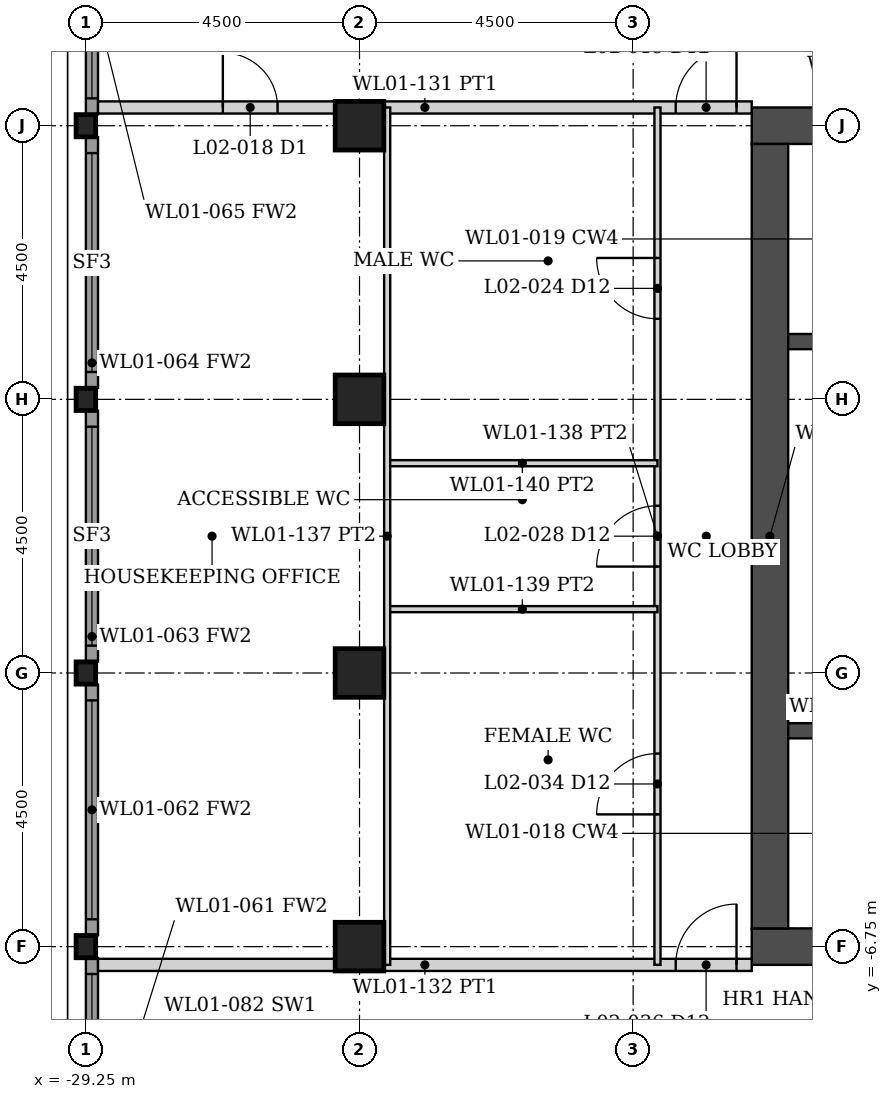
"""IFC4 building model, lengths in metres.
Left out: names, types, materials, properties, quantities, classifications, styles, units other than length and angle.
Written with IfcOpenShell. Run it as: python <this file> out.ifc"""

import sys

from ifc_helpers import new_model, si_unit, direction, frame, frame_2d, origin, origin_2d, place, context, subcontext, project, spatial, rectangle, hollow_rectangle, i_section, extrude, element, fill, save


model = new_model("IFC4")
c1 = context("Model", 3, precision=1e-05, world=origin(), true_north=direction((0.0, 1.0)))
c2 = subcontext(c1, "Body", "Model", "MODEL_VIEW")
j1 = project(units=[si_unit("LENGTHUNIT", "METRE"), si_unit("PLANEANGLEUNIT", "RADIAN")], contexts=[c1])
p1 = place(None, origin())
s1 = spatial("IfcSite", under=j1, at=p1, CompositionType="ELEMENT")
p2 = place(p1, origin())
s2 = spatial("IfcBuilding", under=s1, at=p2, CompositionType="ELEMENT")
p3 = place(p2, frame((0.0, 0.0, 11.0)))
s3 = spatial("IfcBuildingStorey", under=s2, at=p3, CompositionType="ELEMENT", Elevation=11.0)
for number, where, z_axis, x_axis in (
    (1, (-24.75, -6.75, 0.0), (0.0, 0.0, 1.0), (1.0, 0.0, 0.0)),
    (2, (-24.75, -2.25, 0.0), (0.0, 0.0, 1.0), (1.0, 0.0, 0.0)),
    (3, (-24.75, 2.25, 0.0), (0.0, 0.0, 1.0), (1.0, 0.0, 0.0)),
    (4, (-24.75, 6.75, 0.0), (0.0, 0.0, 1.0), (1.0, 0.0, 0.0)),
):
    element("IfcColumn", number, at=place(p3, frame(where, z_axis=z_axis, x_axis=x_axis)), inside=s3, PredefinedType="COLUMN", context=c2, shape_type="SweptSolid", body=[
        extrude(hollow_rectangle(XDim=0.8, YDim=0.8, WallThickness=0.08, at=origin_2d()), origin(), (0.0, 0.0, 1.0), 5.0),
    ])
for number, where, z_axis, x_axis in (
    (5, (-29.25, -6.75, 0.0), (0.0, 0.0, 1.0), (1.0, 0.0, 0.0)),
    (6, (-29.25, -2.25, 0.0), (0.0, 0.0, 1.0), (1.0, 0.0, 0.0)),
    (7, (-29.25, 2.25, 0.0), (0.0, 0.0, 1.0), (1.0, 0.0, 0.0)),
    (8, (-29.25, 6.75, 0.0), (0.0, 0.0, 1.0), (1.0, 0.0, 0.0)),
):
    element("IfcColumn", number, at=place(p3, frame(where, z_axis=z_axis, x_axis=x_axis)), inside=s3, PredefinedType="COLUMN", context=c2, shape_type="SweptSolid", body=[
        extrude(i_section(OverallWidth=0.322, OverallDepth=0.365, WebThickness=0.027, FlangeThickness=0.044, FilletRadius=0.015, at=origin_2d()), origin(), (0.0, 0.0, 1.0), 5.0),
    ])
for number, where, z_axis, x_axis in (
    (9, (-8.7, -6.75, 0.0), (0.0, 0.0, 1.0), (-1.0, 0.0, 0.0)),
    (10, (-8.7, 6.75, 0.0), (0.0, 0.0, 1.0), (-1.0, 0.0, 0.0)),
):
    element("IfcWall", number, at=place(p3, frame(where, z_axis=z_axis, x_axis=x_axis)), inside=s3, PredefinedType="SHEAR", context=c2, shape_type="SweptSolid", body=[
        extrude(rectangle(XDim=9.6, YDim=0.6, at=frame_2d((4.8, 0.0))), origin(), (0.0, 0.0, 1.0), 5.0),
    ])
p4 = place(p3, frame((-18.0, -6.45, 0.0), z_axis=(0.0, 0.0, 1.0), x_axis=(0.0, 1.0, 0.0)))
e11 = element("IfcWall", 11, at=p4, inside=s3, PredefinedType="SHEAR", context=c2, shape_type="SweptSolid", body=[
    extrude(rectangle(XDim=12.9, YDim=0.6, at=frame_2d((6.45, 0.0))), origin(), (0.0, 0.0, 1.0), 5.0),
])
p5 = place(p3, frame((-9.3, -3.2, 0.0), z_axis=(0.0, 0.0, 1.0), x_axis=(-1.0, 0.0, 0.0)))
e12 = element("IfcWall", 12, at=p5, inside=s3, PredefinedType="SHEAR", context=c2, shape_type="SweptSolid", body=[
    extrude(rectangle(XDim=8.4, YDim=0.25, at=frame_2d((4.2, 0.0))), origin(), (0.0, 0.0, 1.0), 5.0),
])
p6 = place(p5, frame((0.15, 0.0, 0.0)))
e13 = element("IfcOpeningElement", 13, at=p6, cuts=e12, PredefinedType="OPENING", context=c2, shape_type="SweptSolid", body=[
    extrude(rectangle(XDim=1.0, YDim=2.1, at=frame_2d((0.5, 1.05))), frame((0.0, 0.135, 0.0), z_axis=(0.0, -1.0, 0.0), x_axis=(1.0, 0.0, 0.0)), (0.0, 0.0, 1.0), 0.27),
])
p7 = place(p3, frame((-9.3, 3.2, 0.0), z_axis=(0.0, 0.0, 1.0), x_axis=(-1.0, 0.0, 0.0)))
e14 = element("IfcWall", 14, at=p7, inside=s3, PredefinedType="SHEAR", context=c2, shape_type="SweptSolid", body=[
    extrude(rectangle(XDim=8.4, YDim=0.25, at=frame_2d((4.2, 0.0))), origin(), (0.0, 0.0, 1.0), 5.0),
])
p8 = place(p3, frame((-29.15, -11.062, 0.0), z_axis=(0.0, 0.0, 1.0), x_axis=(0.0, 1.0, 0.0)))
e15 = element("IfcWall", 15, at=p8, inside=s3, PredefinedType="SOLIDWALL", context=c2, shape_type="SweptSolid", body=[
    extrude(rectangle(XDim=4.125, YDim=0.2, at=frame_2d((2.062, 0.0))), origin(), (0.0, 0.0, 1.0), 4.133),
])
p9 = place(p8, frame((0.262, 0.0, 0.15)))
e16 = element("IfcOpeningElement", 16, at=p9, cuts=e15, PredefinedType="OPENING", context=c2, shape_type="SweptSolid", body=[
    extrude(rectangle(XDim=3.6, YDim=3.833, at=frame_2d((1.8, 1.917))), frame((0.0, 0.11, 0.0), z_axis=(0.0, -1.0, 0.0), x_axis=(1.0, 0.0, 0.0)), (0.0, 0.0, 1.0), 0.22),
])
p10 = place(p3, frame((-29.15, -6.562, 0.0), z_axis=(0.0, 0.0, 1.0), x_axis=(0.0, 1.0, 0.0)))
e17 = element("IfcWall", 17, at=p10, inside=s3, PredefinedType="SOLIDWALL", context=c2, shape_type="SweptSolid", body=[
    extrude(rectangle(XDim=4.125, YDim=0.2, at=frame_2d((2.062, 0.0))), origin(), (0.0, 0.0, 1.0), 4.133),
])
p11 = place(p10, frame((0.262, 0.0, 0.15)))
e18 = element("IfcOpeningElement", 18, at=p11, cuts=e17, PredefinedType="OPENING", context=c2, shape_type="SweptSolid", body=[
    extrude(rectangle(XDim=3.6, YDim=3.833, at=frame_2d((1.8, 1.917))), frame((0.0, 0.11, 0.0), z_axis=(0.0, -1.0, 0.0), x_axis=(1.0, 0.0, 0.0)), (0.0, 0.0, 1.0), 0.22),
])
p12 = place(p3, frame((-29.15, -2.062, 0.0), z_axis=(0.0, 0.0, 1.0), x_axis=(0.0, 1.0, 0.0)))
e19 = element("IfcWall", 19, at=p12, inside=s3, PredefinedType="SOLIDWALL", context=c2, shape_type="SweptSolid", body=[
    extrude(rectangle(XDim=4.125, YDim=0.2, at=frame_2d((2.062, 0.0))), origin(), (0.0, 0.0, 1.0), 4.133),
])
p13 = place(p12, frame((0.262, 0.0, 0.15)))
e20 = element("IfcOpeningElement", 20, at=p13, cuts=e19, PredefinedType="OPENING", context=c2, shape_type="SweptSolid", body=[
    extrude(rectangle(XDim=3.6, YDim=3.833, at=frame_2d((1.8, 1.917))), frame((0.0, 0.11, 0.0), z_axis=(0.0, -1.0, 0.0), x_axis=(1.0, 0.0, 0.0)), (0.0, 0.0, 1.0), 0.22),
])
p14 = place(p3, frame((-29.15, 2.438, 0.0), z_axis=(0.0, 0.0, 1.0), x_axis=(0.0, 1.0, 0.0)))
e21 = element("IfcWall", 21, at=p14, inside=s3, PredefinedType="SOLIDWALL", context=c2, shape_type="SweptSolid", body=[
    extrude(rectangle(XDim=4.125, YDim=0.2, at=frame_2d((2.062, 0.0))), origin(), (0.0, 0.0, 1.0), 4.133),
])
p15 = place(p14, frame((0.262, 0.0, 0.15)))
e22 = element("IfcOpeningElement", 22, at=p15, cuts=e21, PredefinedType="OPENING", context=c2, shape_type="SweptSolid", body=[
    extrude(rectangle(XDim=3.6, YDim=3.833, at=frame_2d((1.8, 1.917))), frame((0.0, 0.11, 0.0), z_axis=(0.0, -1.0, 0.0), x_axis=(1.0, 0.0, 0.0)), (0.0, 0.0, 1.0), 0.22),
])
p16 = place(p3, frame((-29.15, 6.938, 0.0), z_axis=(0.0, 0.0, 1.0), x_axis=(0.0, 1.0, 0.0)))
e23 = element("IfcWall", 23, at=p16, inside=s3, PredefinedType="SOLIDWALL", context=c2, shape_type="SweptSolid", body=[
    extrude(rectangle(XDim=4.125, YDim=0.2, at=frame_2d((2.062, 0.0))), origin(), (0.0, 0.0, 1.0), 4.133),
])
p17 = place(p16, frame((0.262, 0.0, 0.15)))
e24 = element("IfcOpeningElement", 24, at=p17, cuts=e23, PredefinedType="OPENING", context=c2, shape_type="SweptSolid", body=[
    extrude(rectangle(XDim=3.6, YDim=3.833, at=frame_2d((1.8, 1.917))), frame((0.0, 0.11, 0.0), z_axis=(0.0, -1.0, 0.0), x_axis=(1.0, 0.0, 0.0)), (0.0, 0.0, 1.0), 0.22),
])
p18 = place(p3, frame((-29.05, 7.05, 0.0), z_axis=(0.0, 0.0, 1.0), x_axis=(1.0, 0.0, 0.0)))
e25 = element("IfcWall", 25, at=p18, inside=s3, PredefinedType="PARTITIONING", context=c2, shape_type="SweptSolid", body=[
    extrude(rectangle(XDim=10.75, YDim=0.2, at=frame_2d((5.375, 0.0))), origin(), (0.0, 0.0, 1.0), 3.829),
])
p19 = place(p18, frame((2.052, 0.0, 0.0)))
e26 = element("IfcOpeningElement", 26, at=p19, cuts=e25, PredefinedType="OPENING", context=c2, shape_type="SweptSolid", body=[
    extrude(rectangle(XDim=0.9, YDim=2.1, at=frame_2d((0.45, 1.05))), frame((0.0, 0.11, 0.0), z_axis=(0.0, -1.0, 0.0), x_axis=(1.0, 0.0, 0.0)), (0.0, 0.0, 1.0), 0.22),
])
p20 = place(p18, frame((9.5, 0.0, 0.0)))
e27 = element("IfcOpeningElement", 27, at=p20, cuts=e25, PredefinedType="OPENING", context=c2, shape_type="SweptSolid", body=[
    extrude(rectangle(XDim=1.0, YDim=2.1, at=frame_2d((0.5, 1.05))), frame((0.0, 0.11, 0.0), z_axis=(0.0, -1.0, 0.0), x_axis=(1.0, 0.0, 0.0)), (0.0, 0.0, 1.0), 0.22),
])
p21 = place(p3, frame((-29.05, -7.05, 0.0), z_axis=(0.0, 0.0, 1.0), x_axis=(1.0, 0.0, 0.0)))
e28 = element("IfcWall", 28, at=p21, inside=s3, PredefinedType="PARTITIONING", context=c2, shape_type="SweptSolid", body=[
    extrude(rectangle(XDim=10.75, YDim=0.2, at=frame_2d((5.375, 0.0))), origin(), (0.0, 0.0, 1.0), 3.829),
])
p22 = place(p21, frame((9.5, 0.0, 0.0)))
e29 = element("IfcOpeningElement", 29, at=p22, cuts=e28, PredefinedType="OPENING", context=c2, shape_type="SweptSolid", body=[
    extrude(rectangle(XDim=1.0, YDim=2.1, at=frame_2d((0.5, 1.05))), frame((0.0, 0.11, 0.0), z_axis=(0.0, -1.0, 0.0), x_axis=(1.0, 0.0, 0.0)), (0.0, 0.0, 1.0), 0.22),
])
p23 = place(p3, frame((-19.85, -7.05, 0.0), z_axis=(0.0, 0.0, 1.0), x_axis=(0.0, 1.0, 0.0)))
e30 = element("IfcWall", 30, at=p23, inside=s3, PredefinedType="PARTITIONING", context=c2, shape_type="SweptSolid", body=[
    extrude(rectangle(XDim=14.1, YDim=0.1, at=frame_2d((7.05, 0.0))), origin(), (0.0, 0.0, 1.0), 3.829),
])
p24 = place(p23, frame((2.475, 0.0, 0.0)))
e31 = element("IfcOpeningElement", 31, at=p24, cuts=e30, PredefinedType="OPENING", context=c2, shape_type="SweptSolid", body=[
    extrude(rectangle(XDim=1.0, YDim=2.1, at=frame_2d((0.5, 1.05))), frame((0.0, 0.06, 0.0), z_axis=(0.0, -1.0, 0.0), x_axis=(1.0, 0.0, 0.0)), (0.0, 0.0, 1.0), 0.12),
])
p25 = place(p23, frame((6.55, 0.0, 0.0)))
e32 = element("IfcOpeningElement", 32, at=p25, cuts=e30, PredefinedType="OPENING", context=c2, shape_type="SweptSolid", body=[
    extrude(rectangle(XDim=1.0, YDim=2.1, at=frame_2d((0.5, 1.05))), frame((0.0, 0.06, 0.0), z_axis=(0.0, -1.0, 0.0), x_axis=(1.0, 0.0, 0.0)), (0.0, 0.0, 1.0), 0.12),
])
p26 = place(p23, frame((10.625, 0.0, 0.0)))
e33 = element("IfcOpeningElement", 33, at=p26, cuts=e30, PredefinedType="OPENING", context=c2, shape_type="SweptSolid", body=[
    extrude(rectangle(XDim=1.0, YDim=2.1, at=frame_2d((0.5, 1.05))), frame((0.0, 0.06, 0.0), z_axis=(0.0, -1.0, 0.0), x_axis=(1.0, 0.0, 0.0)), (0.0, 0.0, 1.0), 0.12),
])
for number, where, z_axis, x_axis in (
    (34, (-24.295, -1.2, 0.0), (0.0, 0.0, 1.0), (1.0, 0.0, 0.0)),
    (35, (-24.295, 1.2, 0.0), (0.0, 0.0, 1.0), (1.0, 0.0, 0.0)),
):
    element("IfcWall", number, at=place(p3, frame(where, z_axis=z_axis, x_axis=x_axis)), inside=s3, PredefinedType="PARTITIONING", context=c2, shape_type="SweptSolid", body=[
        extrude(rectangle(XDim=4.445, YDim=0.1, at=frame_2d((2.222, 0.0))), origin(), (0.0, 0.0, 1.0), 3.829),
    ])
p27 = place(p3, frame((-24.295, -7.05, 0.0), z_axis=(0.0, 0.0, 1.0), x_axis=(0.0, 1.0, 0.0)))
e36 = element("IfcWall", 36, at=p27, inside=s3, PredefinedType="PARTITIONING", context=c2, shape_type="SweptSolid", body=[
    extrude(rectangle(XDim=14.1, YDim=0.1, at=frame_2d((7.05, 0.0))), origin(), (0.0, 0.0, 1.0), 3.829),
])
p28 = place(p9, origin())
e37 = element("IfcWindow", 37, at=p28, inside=s3, PartitioningType="SINGLE_PANEL", PredefinedType="WINDOW", context=c2, shape_type="SweptSolid", body=[
    extrude(rectangle(XDim=3.6, YDim=3.833, at=frame_2d((1.8, 1.917))), frame((0.0, 0.03, 0.0), z_axis=(0.0, -1.0, 0.0), x_axis=(1.0, 0.0, 0.0)), (0.0, 0.0, 1.0), 0.06),
])
fill(e16, e37)
p29 = place(p11, origin())
e38 = element("IfcWindow", 38, at=p29, inside=s3, PartitioningType="SINGLE_PANEL", PredefinedType="WINDOW", context=c2, shape_type="SweptSolid", body=[
    extrude(rectangle(XDim=3.6, YDim=3.833, at=frame_2d((1.8, 1.917))), frame((0.0, 0.03, 0.0), z_axis=(0.0, -1.0, 0.0), x_axis=(1.0, 0.0, 0.0)), (0.0, 0.0, 1.0), 0.06),
])
fill(e18, e38)
p30 = place(p13, origin())
e39 = element("IfcWindow", 39, at=p30, inside=s3, PartitioningType="SINGLE_PANEL", PredefinedType="WINDOW", context=c2, shape_type="SweptSolid", body=[
    extrude(rectangle(XDim=3.6, YDim=3.833, at=frame_2d((1.8, 1.917))), frame((0.0, 0.03, 0.0), z_axis=(0.0, -1.0, 0.0), x_axis=(1.0, 0.0, 0.0)), (0.0, 0.0, 1.0), 0.06),
])
fill(e20, e39)
p31 = place(p15, origin())
e40 = element("IfcWindow", 40, at=p31, inside=s3, PartitioningType="SINGLE_PANEL", PredefinedType="WINDOW", context=c2, shape_type="SweptSolid", body=[
    extrude(rectangle(XDim=3.6, YDim=3.833, at=frame_2d((1.8, 1.917))), frame((0.0, 0.03, 0.0), z_axis=(0.0, -1.0, 0.0), x_axis=(1.0, 0.0, 0.0)), (0.0, 0.0, 1.0), 0.06),
])
fill(e22, e40)
p32 = place(p17, origin())
e41 = element("IfcWindow", 41, at=p32, inside=s3, PartitioningType="SINGLE_PANEL", PredefinedType="WINDOW", context=c2, shape_type="SweptSolid", body=[
    extrude(rectangle(XDim=3.6, YDim=3.833, at=frame_2d((1.8, 1.917))), frame((0.0, 0.03, 0.0), z_axis=(0.0, -1.0, 0.0), x_axis=(1.0, 0.0, 0.0)), (0.0, 0.0, 1.0), 0.06),
])
fill(e24, e41)
p33 = place(p24, origin())
e42 = element("IfcDoor", 42, at=p33, inside=s3, OperationType="SINGLE_SWING_LEFT", PredefinedType="DOOR", context=c2, shape_type="SweptSolid", body=[
    extrude(rectangle(XDim=1.0, YDim=2.1, at=frame_2d((0.5, 1.05))), frame((0.0, 0.025, 0.0), z_axis=(0.0, -1.0, 0.0), x_axis=(1.0, 0.0, 0.0)), (0.0, 0.0, 1.0), 0.05),
])
fill(e31, e42)
p34 = place(p25, origin())
e43 = element("IfcDoor", 43, at=p34, inside=s3, OperationType="SINGLE_SWING_LEFT", PredefinedType="DOOR", context=c2, shape_type="SweptSolid", body=[
    extrude(rectangle(XDim=1.0, YDim=2.1, at=frame_2d((0.5, 1.05))), frame((0.0, 0.025, 0.0), z_axis=(0.0, -1.0, 0.0), x_axis=(1.0, 0.0, 0.0)), (0.0, 0.0, 1.0), 0.05),
])
fill(e32, e43)
p35 = place(p26, origin())
e44 = element("IfcDoor", 44, at=p35, inside=s3, OperationType="SINGLE_SWING_RIGHT", PredefinedType="DOOR", context=c2, shape_type="SweptSolid", body=[
    extrude(rectangle(XDim=1.0, YDim=2.1, at=frame_2d((0.5, 1.05))), frame((0.0, 0.025, 0.0), z_axis=(0.0, -1.0, 0.0), x_axis=(1.0, 0.0, 0.0)), (0.0, 0.0, 1.0), 0.05),
])
fill(e33, e44)
p36 = place(p19, origin())
e45 = element("IfcDoor", 45, at=p36, inside=s3, OperationType="SINGLE_SWING_LEFT", PredefinedType="DOOR", context=c2, shape_type="SweptSolid", body=[
    extrude(rectangle(XDim=0.9, YDim=2.1, at=frame_2d((0.45, 1.05))), frame((0.0, 0.025, 0.0), z_axis=(0.0, -1.0, 0.0), x_axis=(1.0, 0.0, 0.0)), (0.0, 0.0, 1.0), 0.05),
])
fill(e26, e45)
p37 = place(p20, origin())
e46 = element("IfcDoor", 46, at=p37, inside=s3, OperationType="SINGLE_SWING_RIGHT", PredefinedType="DOOR", context=c2, shape_type="SweptSolid", body=[
    extrude(rectangle(XDim=1.0, YDim=2.1, at=frame_2d((0.5, 1.05))), frame((0.0, 0.025, 0.0), z_axis=(0.0, -1.0, 0.0), x_axis=(1.0, 0.0, 0.0)), (0.0, 0.0, 1.0), 0.05),
])
fill(e27, e46)
p38 = place(p22, origin())
e47 = element("IfcDoor", 47, at=p38, inside=s3, OperationType="SINGLE_SWING_RIGHT", PredefinedType="DOOR", context=c2, shape_type="SweptSolid", body=[
    extrude(rectangle(XDim=1.0, YDim=2.1, at=frame_2d((0.5, 1.05))), frame((0.0, 0.025, 0.0), z_axis=(0.0, -1.0, 0.0), x_axis=(1.0, 0.0, 0.0)), (0.0, 0.0, 1.0), 0.05),
])
fill(e29, e47)
save(model, sys.argv[1])
